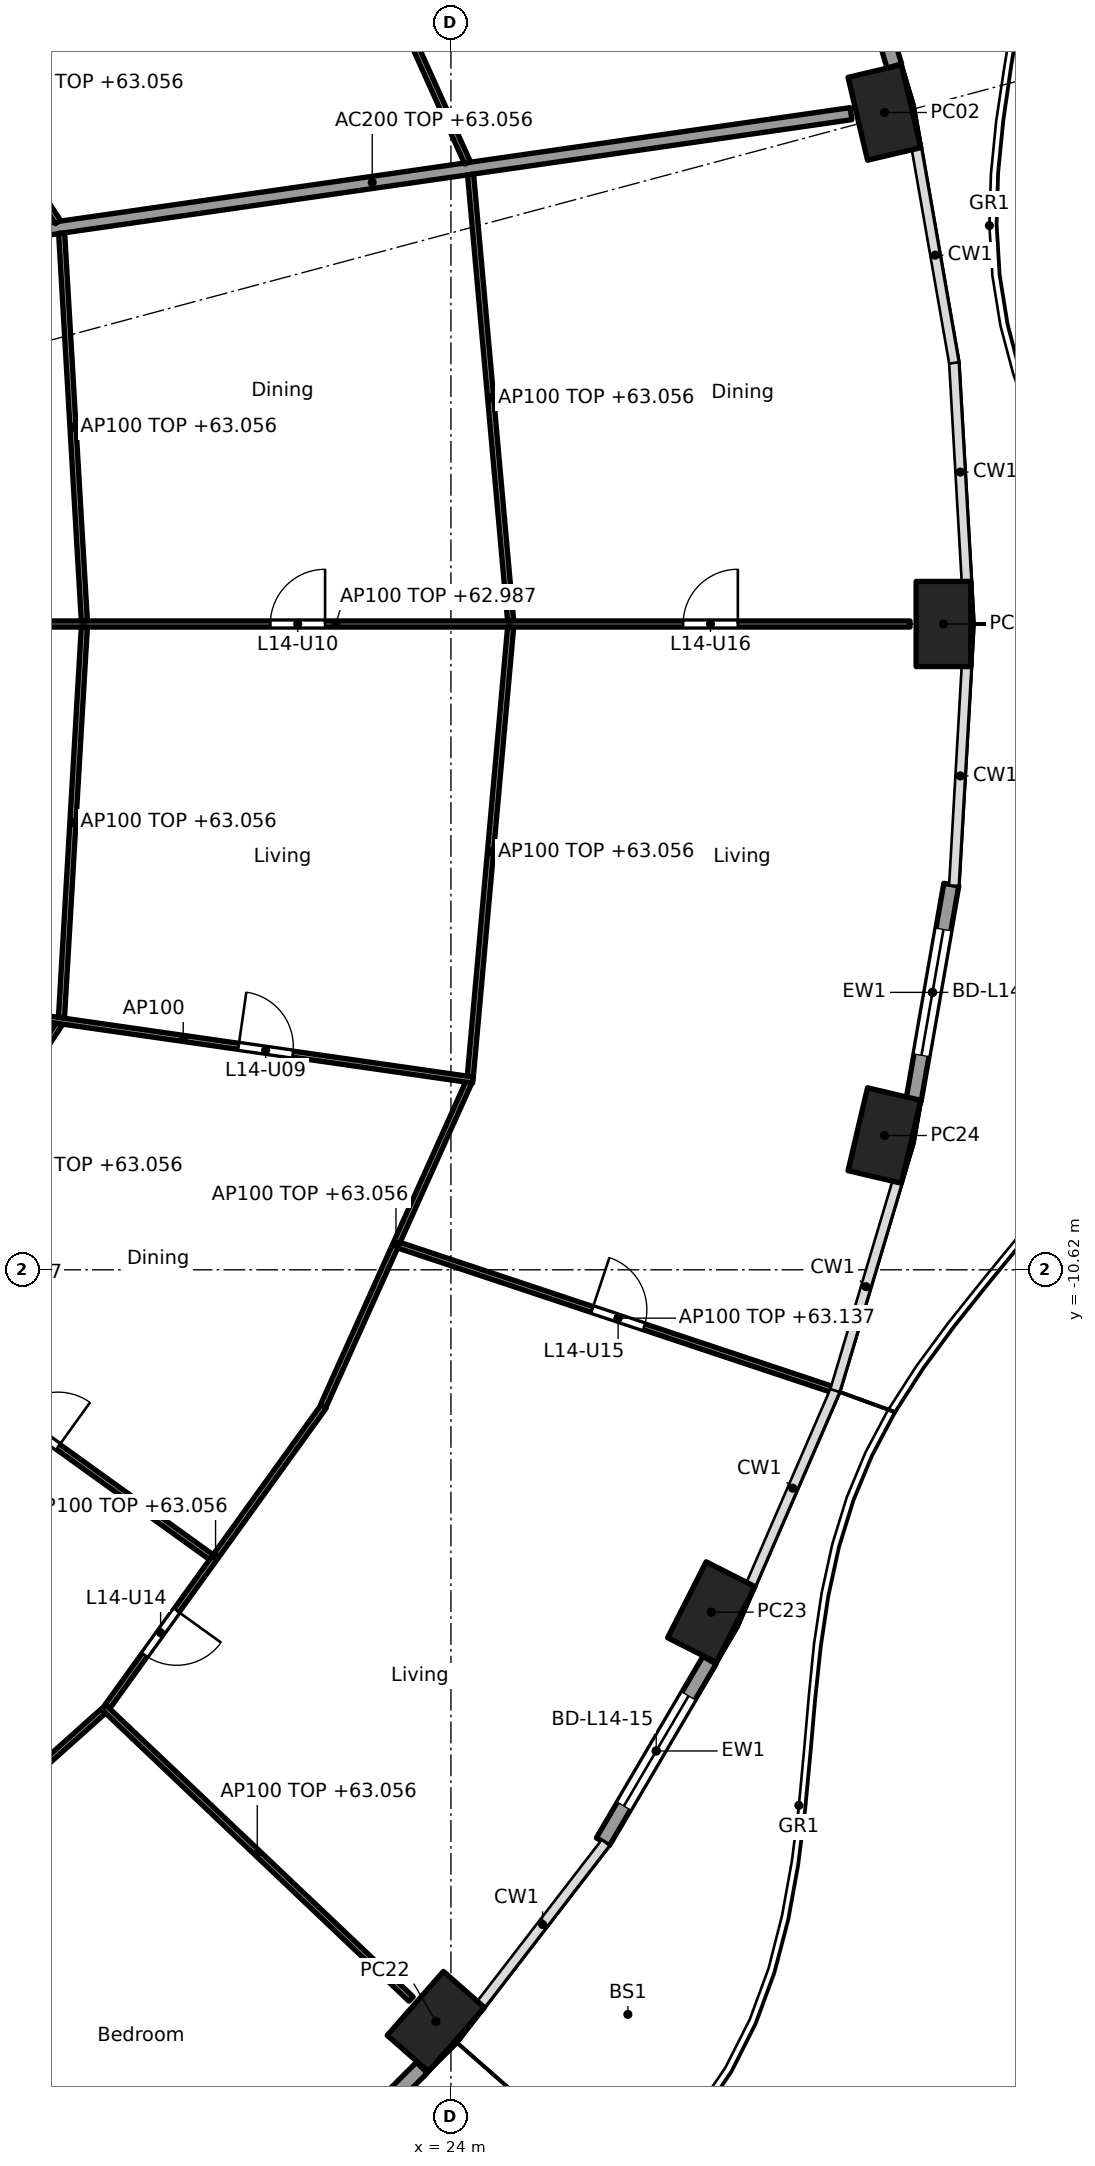
"""IFC4 building model, lengths in metres.
Left out: names, types, materials, properties, quantities, classifications, styles, units other than length and angle.
Written with IfcOpenShell. Run it as: python <this file> out.ifc"""

import sys

from ifc_helpers import new_model, si_unit, direction, frame, frame_2d, origin, origin_2d, place, context, subcontext, project, spatial, rectangle, hollow_rectangle, extrude, element, fill, save


model = new_model("IFC4")
c1 = context("Model", 3, precision=1e-05, world=origin(), true_north=direction((0.0, 1.0)))
c2 = subcontext(c1, "Body", "Model", "MODEL_VIEW")
j1 = project(units=[si_unit("LENGTHUNIT", "METRE"), si_unit("PLANEANGLEUNIT", "RADIAN")], contexts=[c1])
p1 = place(None, origin())
s1 = spatial("IfcSite", under=j1, at=p1, CompositionType="ELEMENT")
p2 = place(p1, origin())
s2 = spatial("IfcBuilding", under=s1, at=p2, CompositionType="ELEMENT")
p3 = place(p2, frame((0.0, 0.0, 60.3)))
s3 = spatial("IfcBuildingStorey", under=s2, at=p3, CompositionType="ELEMENT", Elevation=60.3)
for number, where, z_axis, x_axis in (
    (1, (32.1, 0.0, 0.0), (0.0, 0.0, 1.0), (0.0, 1.0, 0.0)),
    (2, (31.129, 8.412, 0.0), (0.0, 0.0, 1.0), (-0.229, 0.973, 0.0)),
    (3, (23.752, -22.981, 0.0), (0.0, 0.0, 1.0), (0.66, 0.751, 0.0)),
    (4, (28.282, -16.25, 0.0), (0.0, 0.0, 1.0), (0.452, 0.892, 0.0)),
    (5, (31.129, -8.412, 0.0), (0.0, 0.0, 1.0), (0.229, 0.973, 0.0)),
):
    element("IfcColumn", number, at=place(p3, frame(where, z_axis=z_axis, x_axis=x_axis)), inside=s3, PredefinedType="COLUMN", context=c2, shape_type="SweptSolid", body=[
        extrude(hollow_rectangle(XDim=1.4, YDim=0.9, WallThickness=0.05, at=origin_2d()), origin(), (0.0, 0.0, 1.0), 3.7),
    ])
p4 = place(p3, frame((30.273, 12.593, 0.0), z_axis=(0.0, 0.0, 1.0), x_axis=(0.285871309426, -0.958268018065, 0.0)))
e6 = element("IfcWall", 6, at=p4, inside=s3, PredefinedType="SOLIDWALL", context=c2, shape_type="SweptSolid", body=[
    extrude(rectangle(XDim=3.565, YDim=0.25, at=frame_2d((1.783, 0.0))), origin(), (0.0, 0.0, 1.0), 3.44),
])
p5 = place(p4, frame((0.733, 0.0, 0.0)))
e7 = element("IfcOpeningElement", 7, at=p5, cuts=e6, PredefinedType="OPENING", context=c2, shape_type="SweptSolid", body=[
    extrude(rectangle(XDim=2.1, YDim=2.4, at=frame_2d((1.05, 1.2))), frame((0.0, 0.135, 0.0), z_axis=(0.0, -1.0, 0.0), x_axis=(1.0, 0.0, 0.0)), (0.0, 0.0, 1.0), 0.27),
])
p6 = place(p3, frame((23.522, -23.74, 0.0), z_axis=(0.0, 0.0, 1.0), x_axis=(-0.707803094595, -0.706409781417, 0.0)))
e8 = element("IfcWall", 8, at=p6, inside=s3, PredefinedType="SOLIDWALL", context=c2, shape_type="SweptSolid", body=[
    extrude(rectangle(XDim=3.329, YDim=0.25, at=frame_2d((1.665, 0.0))), origin(), (0.0, 0.0, 1.0), 3.44),
])
p7 = place(p6, frame((0.615, 0.0, 0.0)))
e9 = element("IfcOpeningElement", 9, at=p7, cuts=e8, PredefinedType="OPENING", context=c2, shape_type="SweptSolid", body=[
    extrude(rectangle(XDim=2.1, YDim=2.4, at=frame_2d((1.05, 1.2))), frame((0.0, 0.135, 0.0), z_axis=(0.0, -1.0, 0.0), x_axis=(1.0, 0.0, 0.0)), (0.0, 0.0, 1.0), 0.27),
])
p8 = place(p3, frame((28.252, -17.04, 0.0), z_axis=(0.0, 0.0, 1.0), x_axis=(-0.506311160839, -0.862350861546, 0.0)))
e10 = element("IfcWall", 10, at=p8, inside=s3, PredefinedType="SOLIDWALL", context=c2, shape_type="SweptSolid", body=[
    extrude(rectangle(XDim=3.462, YDim=0.25, at=frame_2d((1.731, 0.0))), origin(), (0.0, 0.0, 1.0), 3.44),
])
p9 = place(p8, frame((0.681, 0.0, 0.0)))
e11 = element("IfcOpeningElement", 11, at=p9, cuts=e10, PredefinedType="OPENING", context=c2, shape_type="SweptSolid", body=[
    extrude(rectangle(XDim=2.1, YDim=2.4, at=frame_2d((1.05, 1.2))), frame((0.0, 0.135, 0.0), z_axis=(0.0, -1.0, 0.0), x_axis=(1.0, 0.0, 0.0)), (0.0, 0.0, 1.0), 0.27),
])
p10 = place(p3, frame((32.229, -4.286, 0.0), z_axis=(0.0, 0.0, 1.0), x_axis=(-0.172217377323, -0.98505897029, 0.0)))
e12 = element("IfcWall", 12, at=p10, inside=s3, PredefinedType="SOLIDWALL", context=c2, shape_type="SweptSolid", body=[
    extrude(rectangle(XDim=3.598, YDim=0.25, at=frame_2d((1.799, 0.0))), origin(), (0.0, 0.0, 1.0), 3.44),
])
p11 = place(p10, frame((0.749, 0.0, 0.0)))
e13 = element("IfcOpeningElement", 13, at=p11, cuts=e12, PredefinedType="OPENING", context=c2, shape_type="SweptSolid", body=[
    extrude(rectangle(XDim=2.1, YDim=2.4, at=frame_2d((1.05, 1.2))), frame((0.0, 0.135, 0.0), z_axis=(0.0, -1.0, 0.0), x_axis=(1.0, 0.0, 0.0)), (0.0, 0.0, 1.0), 0.27),
])
p12 = place(p3, frame((14.832, 6.13, 0.0), z_axis=(0.0, 0.0, 1.0), x_axis=(0.989836541293, 0.142209779978, 0.0)))
e14 = element("IfcWall", 14, at=p12, inside=s3, PredefinedType="PARTITIONING", context=c2, shape_type="SweptSolid", body=[
    extrude(rectangle(XDim=15.909, YDim=0.2, at=frame_2d((7.955, 0.0))), origin(), (0.0, 0.0, 1.0), 2.756),
])
p13 = place(p3, frame((12.665, 0.0, 0.0), z_axis=(0.0, 0.0, 1.0), x_axis=(1.0, 0.0, 0.0)))
e15 = element("IfcWall", 15, at=p13, inside=s3, PredefinedType="PARTITIONING", context=c2, shape_type="SweptSolid", body=[
    extrude(rectangle(XDim=18.885, YDim=0.1, at=frame_2d((9.443, 0.0))), origin(), (0.0, 0.0, 1.0), 2.687),
])
p14 = place(p13, frame((2.205, 0.0, 0.0)))
e16 = element("IfcOpeningElement", 16, at=p14, cuts=e15, PredefinedType="OPENING", context=c2, shape_type="SweptSolid", body=[
    extrude(rectangle(XDim=0.9, YDim=2.1, at=frame_2d((0.45, 1.05))), frame((0.0, 0.06, 0.0), z_axis=(0.0, -1.0, 0.0), x_axis=(1.0, 0.0, 0.0)), (0.0, 0.0, 1.0), 0.12),
])
p15 = place(p13, frame((8.366, 0.0, 0.0)))
e17 = element("IfcOpeningElement", 17, at=p15, cuts=e15, PredefinedType="OPENING", context=c2, shape_type="SweptSolid", body=[
    extrude(rectangle(XDim=0.9, YDim=2.1, at=frame_2d((0.45, 1.05))), frame((0.0, 0.06, 0.0), z_axis=(0.0, -1.0, 0.0), x_axis=(1.0, 0.0, 0.0)), (0.0, 0.0, 1.0), 0.12),
])
p16 = place(p13, frame((15.154, 0.0, 0.0)))
e18 = element("IfcOpeningElement", 18, at=p16, cuts=e15, PredefinedType="OPENING", context=c2, shape_type="SweptSolid", body=[
    extrude(rectangle(XDim=0.9, YDim=2.1, at=frame_2d((0.45, 1.05))), frame((0.0, 0.06, 0.0), z_axis=(0.0, -1.0, 0.0), x_axis=(1.0, 0.0, 0.0)), (0.0, 0.0, 1.0), 0.12),
])
p17 = place(p3, frame((17.971, 0.05, 0.0), z_axis=(0.0, 0.0, 1.0), x_axis=(-0.058513659907, 0.998286607946, 0.0)))
e19 = element("IfcWall", 19, at=p17, inside=s3, PredefinedType="PARTITIONING", context=c2, shape_type="SweptSolid", body=[
    extrude(rectangle(XDim=6.388, YDim=0.1, at=frame_2d((3.194, 0.0))), origin(), (0.0, 0.0, 1.0), 2.756),
])
p18 = place(p3, frame((17.971, -0.05, 0.0), z_axis=(0.0, 0.0, 1.0), x_axis=(-0.058475267553, -0.998288857538, 0.0)))
e20 = element("IfcWall", 20, at=p18, inside=s3, PredefinedType="PARTITIONING", context=c2, shape_type="SweptSolid", body=[
    extrude(rectangle(XDim=6.438, YDim=0.1, at=frame_2d((3.219, 0.0))), origin(), (0.0, 0.0, 1.0), 2.756),
])
p19 = place(p3, frame((24.982, 0.05, 0.0), z_axis=(0.0, 0.0, 1.0), x_axis=(-0.08944290521, 0.995991951126, 0.0)))
e21 = element("IfcWall", 21, at=p19, inside=s3, PredefinedType="PARTITIONING", context=c2, shape_type="SweptSolid", body=[
    extrude(rectangle(XDim=7.373, YDim=0.1, at=frame_2d((3.686, 0.0))), origin(), (0.0, 0.0, 1.0), 2.756),
])
p20 = place(p3, frame((24.982, -0.05, 0.0), z_axis=(0.0, 0.0, 1.0), x_axis=(-0.089432471274, -0.995992888068, 0.0)))
e22 = element("IfcWall", 22, at=p20, inside=s3, PredefinedType="PARTITIONING", context=c2, shape_type="SweptSolid", body=[
    extrude(rectangle(XDim=7.423, YDim=0.1, at=frame_2d((3.711, 0.0))), origin(), (0.0, 0.0, 1.0), 2.756),
])
p21 = place(p3, frame((17.537, 6.61, 0.0), z_axis=(0.0, 0.0, 1.0), x_axis=(-0.547637987196, 0.836715384692, 0.0)))
e23 = element("IfcWall", 23, at=p21, inside=s3, PredefinedType="PARTITIONING", context=c2, shape_type="SweptSolid", body=[
    extrude(rectangle(XDim=3.52, YDim=0.1, at=frame_2d((1.76, 0.0))), origin(), (0.0, 0.0, 1.0), 2.756),
])
p22 = place(p3, frame((24.273, 7.584, 0.0), z_axis=(0.0, 0.0, 1.0), x_axis=(-0.410201529109, 0.911994904326, 0.0)))
e24 = element("IfcWall", 24, at=p22, inside=s3, PredefinedType="PARTITIONING", context=c2, shape_type="SweptSolid", body=[
    extrude(rectangle(XDim=5.787, YDim=0.1, at=frame_2d((2.894, 0.0))), origin(), (0.0, 0.0, 1.0), 2.756),
])
p23 = place(p22, frame((2.444, 0.0, 0.0)))
e25 = element("IfcOpeningElement", 25, at=p23, cuts=e24, PredefinedType="OPENING", context=c2, shape_type="SweptSolid", body=[
    extrude(rectangle(XDim=0.9, YDim=2.1, at=frame_2d((0.45, 1.05))), frame((0.0, 0.06, 0.0), z_axis=(0.0, -1.0, 0.0), x_axis=(1.0, 0.0, 0.0)), (0.0, 0.0, 1.0), 0.12),
])
p24 = place(p3, frame((10.003, -15.503, 0.0), z_axis=(0.0, 0.0, 1.0), x_axis=(0.526446106164, -0.850208502254, 0.0)))
e26 = element("IfcWall", 26, at=p24, inside=s3, PredefinedType="PARTITIONING", context=c2, shape_type="SweptSolid", body=[
    extrude(rectangle(XDim=14.33, YDim=0.1, at=frame_2d((7.165, 0.0))), origin(), (0.0, 0.0, 1.0), 2.756),
])
p25 = place(p24, frame((10.415, 0.0, 0.0)))
e27 = element("IfcOpeningElement", 27, at=p25, cuts=e26, PredefinedType="OPENING", context=c2, shape_type="SweptSolid", body=[
    extrude(rectangle(XDim=0.9, YDim=2.1, at=frame_2d((0.45, 1.05))), frame((0.0, 0.06, 0.0), z_axis=(0.0, -1.0, 0.0), x_axis=(1.0, 0.0, 0.0)), (0.0, 0.0, 1.0), 0.12),
])
p26 = place(p3, frame((13.936, -21.761, 0.0), z_axis=(0.0, 0.0, 1.0), x_axis=(0.745806142791, 0.666163041136, 0.0)))
e28 = element("IfcWall", 28, at=p26, inside=s3, PredefinedType="PARTITIONING", context=c2, shape_type="SweptSolid", body=[
    extrude(rectangle(XDim=5.831, YDim=0.1, at=frame_2d((2.915, 0.0))), origin(), (0.0, 0.0, 1.0), 2.756),
])
p27 = place(p3, frame((18.286, -17.809, 0.0), z_axis=(0.0, 0.0, 1.0), x_axis=(0.725242309581, -0.688493712676, 0.0)))
e29 = element("IfcWall", 29, at=p27, inside=s3, PredefinedType="PARTITIONING", context=c2, shape_type="SweptSolid", body=[
    extrude(rectangle(XDim=6.976, YDim=0.1, at=frame_2d((3.488, 0.0))), origin(), (0.0, 0.0, 1.0), 2.756),
])
p28 = place(p3, frame((18.351, -17.803, 0.0), z_axis=(0.0, 0.0, 1.0), x_axis=(0.584558392935, 0.811351640936, 0.0)))
e30 = element("IfcWall", 30, at=p28, inside=s3, PredefinedType="PARTITIONING", context=c2, shape_type="SweptSolid", body=[
    extrude(rectangle(XDim=6.084, YDim=0.1, at=frame_2d((3.042, 0.0))), origin(), (0.0, 0.0, 1.0), 2.756),
])
p29 = place(p28, frame((1.046, 0.0, 0.0)))
e31 = element("IfcOpeningElement", 31, at=p29, cuts=e30, PredefinedType="OPENING", context=c2, shape_type="SweptSolid", body=[
    extrude(rectangle(XDim=0.9, YDim=2.1, at=frame_2d((0.45, 1.05))), frame((0.0, 0.06, 0.0), z_axis=(0.0, -1.0, 0.0), x_axis=(1.0, 0.0, 0.0)), (0.0, 0.0, 1.0), 0.12),
])
p30 = place(p3, frame((9.886, -8.023, 0.0), z_axis=(0.0, 0.0, 1.0), x_axis=(0.811615973871, -0.58419133078, 0.0)))
e32 = element("IfcWall", 32, at=p30, inside=s3, PredefinedType="PARTITIONING", context=c2, shape_type="SweptSolid", body=[
    extrude(rectangle(XDim=12.535, YDim=0.1, at=frame_2d((6.268, 0.0))), origin(), (0.0, 0.0, 1.0), 2.687),
])
p31 = place(p30, frame((2.262, 0.0, 0.0)))
e33 = element("IfcOpeningElement", 33, at=p31, cuts=e32, PredefinedType="OPENING", context=c2, shape_type="SweptSolid", body=[
    extrude(rectangle(XDim=0.9, YDim=2.1, at=frame_2d((0.45, 1.05))), frame((0.0, 0.06, 0.0), z_axis=(0.0, -1.0, 0.0), x_axis=(1.0, 0.0, 0.0)), (0.0, 0.0, 1.0), 0.12),
])
p32 = place(p30, frame((8.53, 0.0, 0.0)))
e34 = element("IfcOpeningElement", 34, at=p32, cuts=e32, PredefinedType="OPENING", context=c2, shape_type="SweptSolid", body=[
    extrude(rectangle(XDim=0.9, YDim=2.1, at=frame_2d((0.45, 1.05))), frame((0.0, 0.06, 0.0), z_axis=(0.0, -1.0, 0.0), x_axis=(1.0, 0.0, 0.0)), (0.0, 0.0, 1.0), 0.12),
])
p33 = place(p3, frame((15.555, -9.639, 0.0), z_axis=(0.0, 0.0, 1.0), x_axis=(0.547618530423, 0.836728119007, 0.0)))
e35 = element("IfcWall", 35, at=p33, inside=s3, PredefinedType="PARTITIONING", context=c2, shape_type="SweptSolid", body=[
    extrude(rectangle(XDim=3.67, YDim=0.1, at=frame_2d((1.835, 0.0))), origin(), (0.0, 0.0, 1.0), 2.756),
])
p34 = place(p3, frame((21.899, -12.861, 0.0), z_axis=(0.0, 0.0, 1.0), x_axis=(0.410197710154, 0.911996622025, 0.0)))
e36 = element("IfcWall", 36, at=p34, inside=s3, PredefinedType="PARTITIONING", context=c2, shape_type="SweptSolid", body=[
    extrude(rectangle(XDim=5.837, YDim=0.1, at=frame_2d((2.918, 0.0))), origin(), (0.0, 0.0, 1.0), 2.756),
])
p35 = place(p3, frame((23.144, -10.216, 0.0), z_axis=(0.0, 0.0, 1.0), x_axis=(0.948811715359, -0.315842253027, 0.0)))
e37 = element("IfcWall", 37, at=p35, inside=s3, PredefinedType="PARTITIONING", context=c2, shape_type="SweptSolid", body=[
    extrude(rectangle(XDim=7.6, YDim=0.1, at=frame_2d((3.8, 0.0))), origin(), (0.0, 0.0, 1.0), 2.837),
])
p36 = place(p35, frame((3.35, 0.0, 0.0)))
e38 = element("IfcOpeningElement", 38, at=p36, cuts=e37, PredefinedType="OPENING", context=c2, shape_type="SweptSolid", body=[
    extrude(rectangle(XDim=0.9, YDim=2.1, at=frame_2d((0.45, 1.05))), frame((0.0, 0.06, 0.0), z_axis=(0.0, -1.0, 0.0), x_axis=(1.0, 0.0, 0.0)), (0.0, 0.0, 1.0), 0.12),
])
p37 = place(p3, frame((14.832, -6.13, 0.0), z_axis=(0.0, 0.0, 1.0), x_axis=(0.989837122016, -0.142205737856, 0.0)))
e39 = element("IfcWall", 39, at=p37, inside=s3, PredefinedType="PARTITIONING", context=c2, shape_type="SweptSolid", body=[
    extrude(rectangle(XDim=9.63, YDim=0.1, at=frame_2d((4.815, 0.0))), origin(), (0.0, 0.0, 1.0), 3.44),
])
p38 = place(p37, frame((1.182, 0.0, 0.0)))
e40 = element("IfcOpeningElement", 40, at=p38, cuts=e39, PredefinedType="OPENING", context=c2, shape_type="SweptSolid", body=[
    extrude(rectangle(XDim=0.9, YDim=2.1, at=frame_2d((0.45, 1.05))), frame((0.0, 0.06, 0.0), z_axis=(0.0, -1.0, 0.0), x_axis=(1.0, 0.0, 0.0)), (0.0, 0.0, 1.0), 0.12),
])
p39 = place(p37, frame((5.734, 0.0, 0.0)))
e41 = element("IfcOpeningElement", 41, at=p39, cuts=e39, PredefinedType="OPENING", context=c2, shape_type="SweptSolid", body=[
    extrude(rectangle(XDim=0.9, YDim=2.1, at=frame_2d((0.45, 1.05))), frame((0.0, 0.06, 0.0), z_axis=(0.0, -1.0, 0.0), x_axis=(1.0, 0.0, 0.0)), (0.0, 0.0, 1.0), 0.12),
])
p40 = place(p9, origin())
e42 = element("IfcDoor", 42, at=p40, inside=s3, OperationType="SLIDING_TO_LEFT", PredefinedType="DOOR", context=c2, shape_type="SweptSolid", body=[
    extrude(rectangle(XDim=2.1, YDim=2.4, at=frame_2d((1.05, 1.2))), frame((0.0, 0.025, 0.0), z_axis=(0.0, -1.0, 0.0), x_axis=(1.0, 0.0, 0.0)), (0.0, 0.0, 1.0), 0.05),
])
fill(e11, e42)
p41 = place(p11, origin())
e43 = element("IfcDoor", 43, at=p41, inside=s3, OperationType="SLIDING_TO_LEFT", PredefinedType="DOOR", context=c2, shape_type="SweptSolid", body=[
    extrude(rectangle(XDim=2.1, YDim=2.4, at=frame_2d((1.05, 1.2))), frame((0.0, 0.025, 0.0), z_axis=(0.0, -1.0, 0.0), x_axis=(1.0, 0.0, 0.0)), (0.0, 0.0, 1.0), 0.05),
])
fill(e13, e43)
p42 = place(p32, origin())
e44 = element("IfcDoor", 44, at=p42, inside=s3, OperationType="SINGLE_SWING_RIGHT", PredefinedType="DOOR", context=c2, shape_type="SweptSolid", body=[
    extrude(rectangle(XDim=0.9, YDim=2.1, at=frame_2d((0.45, 1.05))), frame((0.0, 0.025, 0.0), z_axis=(0.0, -1.0, 0.0), x_axis=(1.0, 0.0, 0.0)), (0.0, 0.0, 1.0), 0.05),
])
fill(e34, e44)
p43 = place(p39, origin())
e45 = element("IfcDoor", 45, at=p43, inside=s3, OperationType="SINGLE_SWING_LEFT", PredefinedType="DOOR", context=c2, shape_type="SweptSolid", body=[
    extrude(rectangle(XDim=0.9, YDim=2.1, at=frame_2d((0.45, 1.05))), frame((0.0, 0.025, 0.0), z_axis=(0.0, -1.0, 0.0), x_axis=(1.0, 0.0, 0.0)), (0.0, 0.0, 1.0), 0.05),
])
fill(e41, e45)
p44 = place(p15, origin())
e46 = element("IfcDoor", 46, at=p44, inside=s3, OperationType="SINGLE_SWING_RIGHT", PredefinedType="DOOR", context=c2, shape_type="SweptSolid", body=[
    extrude(rectangle(XDim=0.9, YDim=2.1, at=frame_2d((0.45, 1.05))), frame((0.0, 0.025, 0.0), z_axis=(0.0, -1.0, 0.0), x_axis=(1.0, 0.0, 0.0)), (0.0, 0.0, 1.0), 0.05),
])
fill(e17, e46)
p45 = place(p29, frame((0.9, 0.0, 0.0), x_axis=(-1.0, 0.0, 0.0)))
e47 = element("IfcDoor", 47, at=p45, inside=s3, OperationType="SINGLE_SWING_LEFT", PredefinedType="DOOR", context=c2, shape_type="SweptSolid", body=[
    extrude(rectangle(XDim=0.9, YDim=2.1, at=frame_2d((0.45, 1.05))), frame((0.0, 0.025, 0.0), z_axis=(0.0, -1.0, 0.0), x_axis=(1.0, 0.0, 0.0)), (0.0, 0.0, 1.0), 0.05),
])
fill(e31, e47)
p46 = place(p36, origin())
e48 = element("IfcDoor", 48, at=p46, inside=s3, OperationType="SINGLE_SWING_LEFT", PredefinedType="DOOR", context=c2, shape_type="SweptSolid", body=[
    extrude(rectangle(XDim=0.9, YDim=2.1, at=frame_2d((0.45, 1.05))), frame((0.0, 0.025, 0.0), z_axis=(0.0, -1.0, 0.0), x_axis=(1.0, 0.0, 0.0)), (0.0, 0.0, 1.0), 0.05),
])
fill(e38, e48)
p47 = place(p16, origin())
e49 = element("IfcDoor", 49, at=p47, inside=s3, OperationType="SINGLE_SWING_RIGHT", PredefinedType="DOOR", context=c2, shape_type="SweptSolid", body=[
    extrude(rectangle(XDim=0.9, YDim=2.1, at=frame_2d((0.45, 1.05))), frame((0.0, 0.025, 0.0), z_axis=(0.0, -1.0, 0.0), x_axis=(1.0, 0.0, 0.0)), (0.0, 0.0, 1.0), 0.05),
])
fill(e18, e49)
save(model, sys.argv[1])
